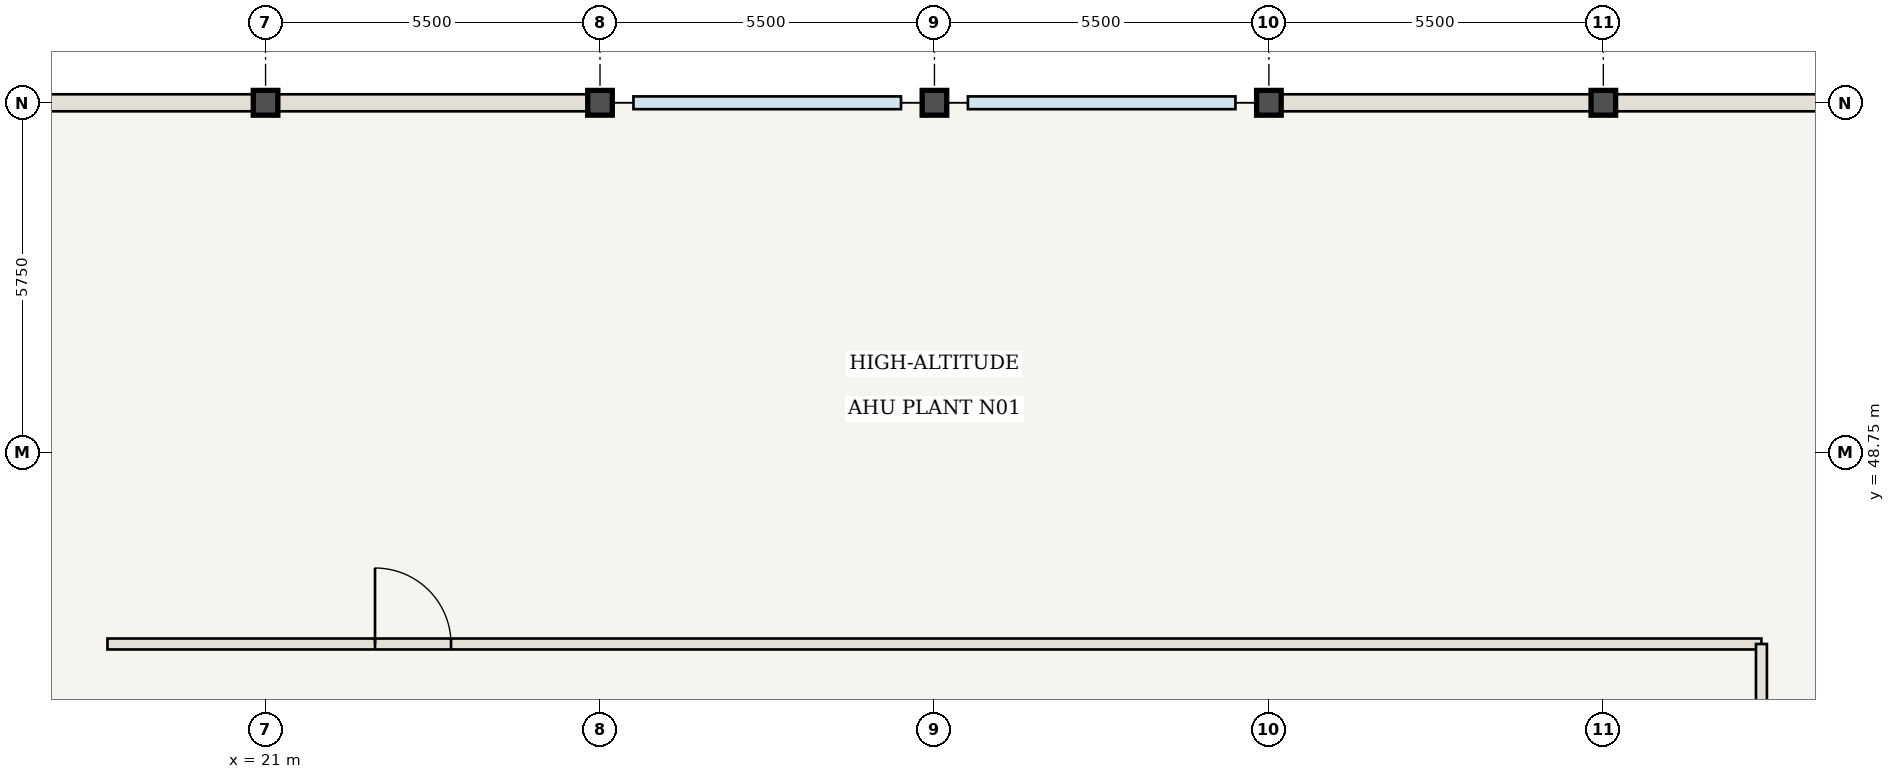
"""IFC4 building model, lengths in metres.
Left out: names, types, materials, properties, quantities, classifications, styles, units other than length and angle.
Written with IfcOpenShell. Run it as: python <this file> out.ifc"""

import sys

from ifc_helpers import new_model, si_unit, direction, frame, frame_2d, origin, origin_2d, place, context, subcontext, project, spatial, rectangle, i_section, extrude, element, fill, save


model = new_model("IFC4")
c1 = context("Model", 3, precision=1e-05, world=origin(), true_north=direction((0.0, 1.0)))
c2 = subcontext(c1, "Body", "Model", "MODEL_VIEW")
j1 = project(units=[si_unit("LENGTHUNIT", "METRE"), si_unit("PLANEANGLEUNIT", "RADIAN")], contexts=[c1])
p1 = place(None, origin())
s1 = spatial("IfcSite", under=j1, at=p1, CompositionType="ELEMENT")
p2 = place(p1, origin())
s2 = spatial("IfcBuilding", under=s1, at=p2, CompositionType="ELEMENT")
p3 = place(p2, frame((0.0, 0.0, 317.8)))
s3 = spatial("IfcBuildingStorey", under=s2, at=p3, CompositionType="ELEMENT", Elevation=317.8)
for number, where, z_axis, x_axis in (
    (1, (21.0, 54.5, 0.0), (0.0, 0.0, 1.0), (1.0, 0.0, 0.0)),
    (2, (26.5, 54.5, 0.0), (0.0, 0.0, 1.0), (1.0, 0.0, 0.0)),
    (3, (32.0, 54.5, 0.0), (0.0, 0.0, 1.0), (1.0, 0.0, 0.0)),
    (4, (37.5, 54.5, 0.0), (0.0, 0.0, 1.0), (1.0, 0.0, 0.0)),
    (5, (43.0, 54.5, 0.0), (0.0, 0.0, 1.0), (1.0, 0.0, 0.0)),
):
    element("IfcColumn", number, at=place(p3, frame(where, z_axis=z_axis, x_axis=x_axis)), inside=s3, PredefinedType="COLUMN", context=c2, shape_type="SweptSolid", body=[
        extrude(i_section(OverallWidth=0.404, OverallDepth=0.407, WebThickness=0.027, FlangeThickness=0.044, at=origin_2d()), origin(), (0.0, 0.0, 1.0), 4.55),
    ])
p4 = place(p3, frame((18.4, 45.6, 0.0), z_axis=(0.0, 0.0, 1.0), x_axis=(1.0, 0.0, 0.0)))
e6 = element("IfcWall", 6, at=p4, inside=s3, PredefinedType="STANDARD", context=c2, shape_type="SweptSolid", body=[
    extrude(rectangle(XDim=27.2, YDim=0.18, at=frame_2d((13.6, 0.0))), origin(), (0.0, 0.0, 1.0), 4.29),
])
p5 = place(p4, frame((4.4, 0.0, 0.0)))
e7 = element("IfcOpeningElement", 7, at=p5, cuts=e6, PredefinedType="OPENING", context=c2, shape_type="SweptSolid", body=[
    extrude(rectangle(XDim=1.25, YDim=2.2, at=frame_2d((0.625, 1.1))), frame((0.0, 0.1, 0.0), z_axis=(0.0, -1.0, 0.0), x_axis=(1.0, 0.0, 0.0)), (0.0, 0.0, 1.0), 0.2),
])
p6 = place(p3, frame((45.6, 18.4, 0.0), z_axis=(0.0, 0.0, 1.0), x_axis=(0.0, 1.0, 0.0)))
e8 = element("IfcWall", 8, at=p6, inside=s3, PredefinedType="STANDARD", context=c2, shape_type="SweptSolid", body=[
    extrude(rectangle(XDim=27.2, YDim=0.18, at=frame_2d((13.6, 0.0))), origin(), (0.0, 0.0, 1.0), 4.29),
])
p7 = place(p6, frame((14.55, 0.0, 0.0)))
e9 = element("IfcOpeningElement", 9, at=p7, cuts=e8, PredefinedType="OPENING", context=c2, shape_type="SweptSolid", body=[
    extrude(rectangle(XDim=1.25, YDim=2.2, at=frame_2d((0.625, 1.1))), frame((0.0, 0.1, 0.0), z_axis=(0.0, -1.0, 0.0), x_axis=(1.0, 0.0, 0.0)), (0.0, 0.0, 1.0), 0.2),
])
for number, where, z_axis, x_axis in (
    (10, (15.5, 54.5, 0.0), (0.0, 0.0, 1.0), (1.0, 0.0, 0.0)),
    (11, (21.0, 54.5, 0.0), (0.0, 0.0, 1.0), (1.0, 0.0, 0.0)),
    (12, (37.5, 54.5, 0.0), (0.0, 0.0, 1.0), (1.0, 0.0, 0.0)),
    (13, (43.0, 54.5, 0.0), (0.0, 0.0, 1.0), (1.0, 0.0, 0.0)),
):
    element("IfcWall", number, at=place(p3, frame(where, z_axis=z_axis, x_axis=x_axis)), inside=s3, PredefinedType="USERDEFINED", context=c2, shape_type="SweptSolid", body=[
        extrude(rectangle(XDim=5.5, YDim=0.28, at=frame_2d((2.75, 0.0))), origin(), (0.0, 0.0, 1.0), 3.57),
    ])
p8 = place(p5, origin())
e14 = element("IfcDoor", 14, at=p8, inside=s3, OperationType="SINGLE_SWING_LEFT", PredefinedType="DOOR", context=c2, shape_type="SweptSolid", body=[
    extrude(rectangle(XDim=1.25, YDim=2.2, at=frame_2d((0.625, 1.1))), frame((0.0, 0.025, 0.0), z_axis=(0.0, -1.0, 0.0), x_axis=(1.0, 0.0, 0.0)), (0.0, 0.0, 1.0), 0.05),
])
fill(e7, e14)
save(model, sys.argv[1])
